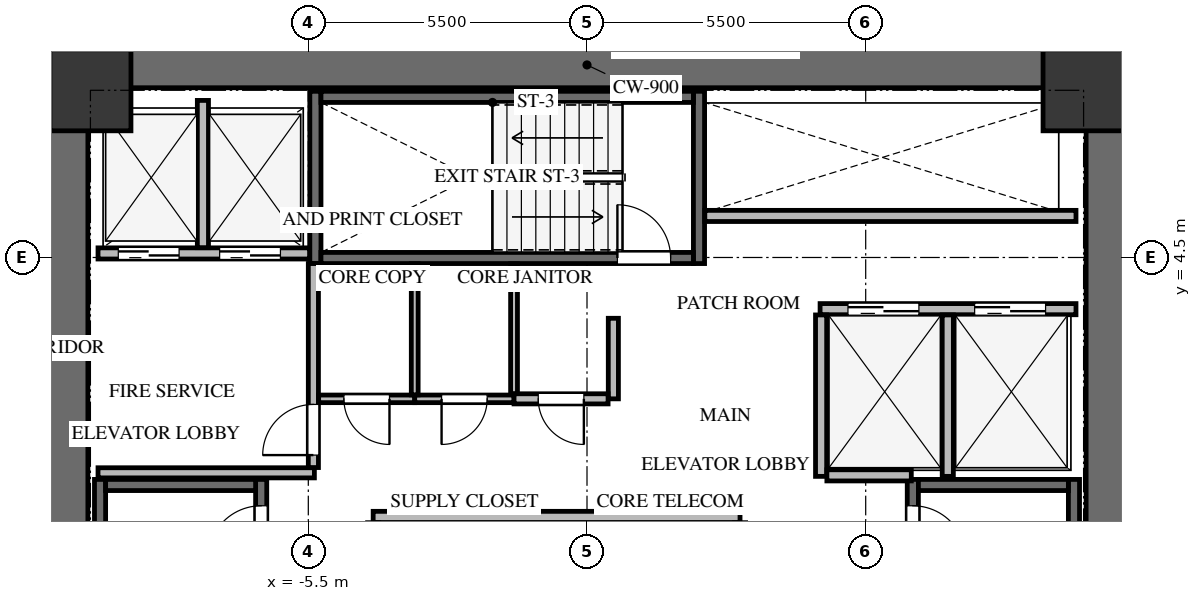
"""IFC4 building model, lengths in metres.
Left out: names, types, materials, properties, quantities, classifications, styles, units other than length and angle.
Written with IfcOpenShell. Run it as: python <this file> out.ifc"""

import sys

from ifc_helpers import new_model, si_unit, direction, frame, frame_2d, origin, origin_2d, place, context, subcontext, project, spatial, rectangle, extrude, source, transform, mapped, element, fill, save


model = new_model("IFC4")
c1 = context("Model", 3, precision=1e-05, world=origin(), true_north=direction((0.0, 1.0)))
c2 = subcontext(c1, "Body", "Model", "MODEL_VIEW")
j1 = project(units=[si_unit("LENGTHUNIT", "METRE"), si_unit("PLANEANGLEUNIT", "RADIAN")], contexts=[c1])
p1 = place(None, origin())
s1 = spatial("IfcSite", under=j1, at=p1, CompositionType="ELEMENT")
p2 = place(p1, origin())
s2 = spatial("IfcBuilding", under=s1, at=p2, CompositionType="ELEMENT")
p3 = place(p2, frame((0.0, 0.0, 52.2)))
s3 = spatial("IfcBuildingStorey", under=s2, at=p3, CompositionType="ELEMENT", Elevation=52.2)
for number, where, z_axis, x_axis in (
    (1, (-10.3, -8.75, 0.0), (0.0, 0.0, 1.0), (0.0, 1.0, 0.0)),
    (2, (10.3, -8.75, 0.0), (0.0, 0.0, 1.0), (0.0, 1.0, 0.0)),
):
    element("IfcWall", number, at=place(p3, frame(where, z_axis=z_axis, x_axis=x_axis)), inside=s3, PredefinedType="SHEAR", context=c2, shape_type="SweptSolid", body=[
        extrude(rectangle(XDim=17.5, YDim=0.9, at=frame_2d((8.75, 0.0))), origin(), (0.0, 0.0, 1.0), 3.3),
    ])
p4 = place(p3, frame((-9.85, 8.3, 0.0), z_axis=(0.0, 0.0, 1.0), x_axis=(1.0, 0.0, 0.0)))
e3 = element("IfcWall", 3, at=p4, inside=s3, PredefinedType="SHEAR", context=c2, shape_type="SweptSolid", body=[
    extrude(rectangle(XDim=19.7, YDim=0.9, at=frame_2d((9.85, 0.0))), origin(), (0.0, 0.0, 1.0), 3.3),
])
p5 = place(p3, frame((-6.43, -7.77, -0.24), z_axis=(0.0, 0.0, 1.0), x_axis=(0.0, 1.0, 0.0)))
e4 = element("IfcWall", 4, at=p5, inside=s3, PredefinedType="SHEAR", context=c2, shape_type="SweptSolid", body=[
    extrude(rectangle(XDim=7.89, YDim=0.22, at=frame_2d((3.945, 0.0))), origin(), (0.0, 0.0, 1.0), 3.3),
])
p6 = place(p5, frame((6.32, 0.0, 0.0)))
e5 = element("IfcOpeningElement", 5, at=p6, cuts=e4, PredefinedType="OPENING", context=c2, shape_type="SweptSolid", body=[
    extrude(rectangle(XDim=1.05, YDim=2.15, at=frame_2d((0.525, 1.075))), frame((0.0, 0.12, 0.0), z_axis=(0.0, -1.0, 0.0), x_axis=(1.0, 0.0, 0.0)), (0.0, 0.0, 1.0), 0.24),
])
p7 = place(p3, frame((-9.61, 0.12, -0.24), z_axis=(0.0, 0.0, 1.0), x_axis=(0.0, -1.0, 0.0)))
e6 = element("IfcWall", 6, at=p7, inside=s3, PredefinedType="SHEAR", context=c2, shape_type="SweptSolid", body=[
    extrude(rectangle(XDim=7.89, YDim=0.22, at=frame_2d((3.945, 0.0))), origin(), (0.0, 0.0, 1.0), 3.3),
])
p8 = place(p3, frame((-6.54, 0.01, -0.24), z_axis=(0.0, 0.0, 1.0), x_axis=(-1.0, 0.0, 0.0)))
e7 = element("IfcWall", 7, at=p8, inside=s3, PredefinedType="SHEAR", context=c2, shape_type="SweptSolid", body=[
    extrude(rectangle(XDim=2.96, YDim=0.22, at=frame_2d((1.48, 0.0))), origin(), (0.0, 0.0, 1.0), 3.3),
])
p9 = place(p3, frame((9.61, -7.77, -0.24), z_axis=(0.0, 0.0, 1.0), x_axis=(0.0, 1.0, 0.0)))
e8 = element("IfcWall", 8, at=p9, inside=s3, PredefinedType="SHEAR", context=c2, shape_type="SweptSolid", body=[
    extrude(rectangle(XDim=7.89, YDim=0.22, at=frame_2d((3.945, 0.0))), origin(), (0.0, 0.0, 1.0), 3.3),
])
p10 = place(p3, frame((6.43, 0.12, -0.24), z_axis=(0.0, 0.0, 1.0), x_axis=(0.0, -1.0, 0.0)))
e9 = element("IfcWall", 9, at=p10, inside=s3, PredefinedType="SHEAR", context=c2, shape_type="SweptSolid", body=[
    extrude(rectangle(XDim=7.89, YDim=0.22, at=frame_2d((3.945, 0.0))), origin(), (0.0, 0.0, 1.0), 3.3),
])
p11 = place(p10, frame((0.52, 0.0, 0.0)))
e10 = element("IfcOpeningElement", 10, at=p11, cuts=e9, PredefinedType="OPENING", context=c2, shape_type="SweptSolid", body=[
    extrude(rectangle(XDim=1.05, YDim=2.15, at=frame_2d((0.525, 1.075))), frame((0.0, 0.12, 0.0), z_axis=(0.0, -1.0, 0.0), x_axis=(1.0, 0.0, 0.0)), (0.0, 0.0, 1.0), 0.24),
])
p12 = place(p3, frame((9.5, 0.01, -0.24), z_axis=(0.0, 0.0, 1.0), x_axis=(-1.0, 0.0, 0.0)))
e11 = element("IfcWall", 11, at=p12, inside=s3, PredefinedType="SHEAR", context=c2, shape_type="SweptSolid", body=[
    extrude(rectangle(XDim=2.96, YDim=0.22, at=frame_2d((1.48, 0.0))), origin(), (0.0, 0.0, 1.0), 3.3),
])
for number, where, z_axis, x_axis in (
    (12, (2.21, 4.38, -0.24), (0.0, 0.0, 1.0), (0.0, 1.0, 0.0)),
    (13, (-5.36, 7.78, -0.24), (0.0, 0.0, 1.0), (0.0, -1.0, 0.0)),
):
    element("IfcWall", number, at=place(p3, frame(where, z_axis=z_axis, x_axis=x_axis)), inside=s3, PredefinedType="SHEAR", context=c2, shape_type="SweptSolid", body=[
        extrude(rectangle(XDim=3.4, YDim=0.22, at=frame_2d((1.7, 0.0))), origin(), (0.0, 0.0, 1.0), 3.3),
    ])
p13 = place(p3, frame((-5.25, 4.49, -0.24), z_axis=(0.0, 0.0, 1.0), x_axis=(1.0, 0.0, 0.0)))
e14 = element("IfcWall", 14, at=p13, inside=s3, PredefinedType="SHEAR", context=c2, shape_type="SweptSolid", body=[
    extrude(rectangle(XDim=7.35, YDim=0.22, at=frame_2d((3.675, 0.0))), origin(), (0.0, 0.0, 1.0), 3.3),
])
p14 = place(p13, frame((5.85, 0.0, 0.0)))
e15 = element("IfcOpeningElement", 15, at=p14, cuts=e14, PredefinedType="OPENING", context=c2, shape_type="SweptSolid", body=[
    extrude(rectangle(XDim=1.05, YDim=2.15, at=frame_2d((0.525, 1.075))), frame((0.0, 0.12, 0.0), z_axis=(0.0, -1.0, 0.0), x_axis=(1.0, 0.0, 0.0)), (0.0, 0.0, 1.0), 0.24),
])
p15 = place(p3, frame((2.1, 7.67, -0.24), z_axis=(0.0, 0.0, 1.0), x_axis=(-1.0, 0.0, 0.0)))
e16 = element("IfcWall", 16, at=p15, inside=s3, PredefinedType="SHEAR", context=c2, shape_type="SweptSolid", body=[
    extrude(rectangle(XDim=7.35, YDim=0.22, at=frame_2d((3.675, 0.0))), origin(), (0.0, 0.0, 1.0), 3.3),
])
m1 = source(origin(), c2, "Body", "SweptSolid", [
    extrude(rectangle(XDim=1.6, YDim=1.6, at=origin_2d()), origin(), (0.0, 0.0, 1.0), 3.3),
])
for number, where, z_axis, x_axis in (
    (17, (9.8, 7.8, -0.24), (0.0, 0.0, 1.0), (1.0, 0.0, 0.0)),
    (18, (-9.8, 7.8, -0.24), (0.0, 0.0, 1.0), (1.0, 0.0, 0.0)),
):
    element("IfcColumn", number, at=place(p3, frame(where, z_axis=z_axis, x_axis=x_axis)), inside=s3, PredefinedType="COLUMN", context=c2, shape_type="MappedRepresentation", body=[
        mapped(m1, transform((0.0, 0.0, 0.0), x_axis=(1.0, 0.0, 0.0), y_axis=(0.0, 1.0, 0.0), z_axis=(0.0, 0.0, 1.0), scale=1.0)),
    ])
p16 = place(p3, frame((-9.65, 4.58, 0.0), z_axis=(0.0, 0.0, 1.0), x_axis=(1.0, 0.0, 0.0)))
e19 = element("IfcWall", 19, at=p16, inside=s3, PredefinedType="SOLIDWALL", context=c2, shape_type="SweptSolid", body=[
    extrude(rectangle(XDim=4.175, YDim=0.22, at=frame_2d((2.087, 0.0))), origin(), (0.0, 0.0, 1.0), 3.045),
])
p17 = place(p16, frame((0.4, 0.0, 0.0)))
e20 = element("IfcOpeningElement", 20, at=p17, cuts=e19, PredefinedType="OPENING", context=c2, shape_type="SweptSolid", body=[
    extrude(rectangle(XDim=1.2, YDim=2.15, at=frame_2d((0.6, 1.075))), frame((0.0, 0.12, 0.0), z_axis=(0.0, -1.0, 0.0), x_axis=(1.0, 0.0, 0.0)), (0.0, 0.0, 1.0), 0.24),
])
p18 = place(p16, frame((2.4, 0.0, 0.0)))
e21 = element("IfcOpeningElement", 21, at=p18, cuts=e19, PredefinedType="OPENING", context=c2, shape_type="SweptSolid", body=[
    extrude(rectangle(XDim=1.2, YDim=2.15, at=frame_2d((0.6, 1.075))), frame((0.0, 0.12, 0.0), z_axis=(0.0, -1.0, 0.0), x_axis=(1.0, 0.0, 0.0)), (0.0, 0.0, 1.0), 0.24),
])
p19 = place(p3, frame((-7.58, 4.694, 0.0), z_axis=(0.0, 0.0, 1.0), x_axis=(0.0, 1.0, 0.0)))
e22 = element("IfcWall", 22, at=p19, inside=s3, PredefinedType="SOLIDWALL", context=c2, shape_type="SweptSolid", body=[
    extrude(rectangle(XDim=2.906, YDim=0.22, at=frame_2d((1.453, 0.0))), origin(), (0.0, 0.0, 1.0), 3.045),
])
p20 = place(p3, frame((-9.65, 0.25, 0.0), z_axis=(0.0, 0.0, 1.0), x_axis=(1.0, 0.0, 0.0)))
e23 = element("IfcWall", 23, at=p20, inside=s3, PredefinedType="SOLIDWALL", context=c2, shape_type="SweptSolid", body=[
    extrude(rectangle(XDim=4.27, YDim=0.2, at=frame_2d((2.135, 0.0))), origin(), (0.0, 0.0, 1.0), 3.045),
])
p21 = place(p3, frame((-5.4, 0.354, 0.0), z_axis=(0.0, 0.0, 1.0), x_axis=(0.0, 1.0, 0.0)))
e24 = element("IfcWall", 24, at=p21, inside=s3, PredefinedType="SOLIDWALL", context=c2, shape_type="SweptSolid", body=[
    extrude(rectangle(XDim=4.026, YDim=0.2, at=frame_2d((2.013, 0.0))), origin(), (0.0, 0.0, 1.0), 3.045),
])
p22 = place(p21, frame((0.246, 0.0, 0.0)))
e25 = element("IfcOpeningElement", 25, at=p22, cuts=e24, PredefinedType="OPENING", context=c2, shape_type="SweptSolid", body=[
    extrude(rectangle(XDim=1.0, YDim=2.15, at=frame_2d((0.5, 1.075))), frame((0.0, 0.11, 0.0), z_axis=(0.0, -1.0, 0.0), x_axis=(1.0, 0.0, 0.0)), (0.0, 0.0, 1.0), 0.22),
])
p23 = place(p3, frame((4.6, 3.48, 0.0), z_axis=(0.0, 0.0, 1.0), x_axis=(1.0, 0.0, 0.0)))
e26 = element("IfcWall", 26, at=p23, inside=s3, PredefinedType="SOLIDWALL", context=c2, shape_type="SweptSolid", body=[
    extrude(rectangle(XDim=5.05, YDim=0.22, at=frame_2d((2.525, 0.0))), origin(), (0.0, 0.0, 1.0), 3.045),
])
p24 = place(p23, frame((0.55, 0.0, 0.0)))
e27 = element("IfcOpeningElement", 27, at=p24, cuts=e26, PredefinedType="OPENING", context=c2, shape_type="SweptSolid", body=[
    extrude(rectangle(XDim=1.4, YDim=2.15, at=frame_2d((0.7, 1.075))), frame((0.0, 0.12, 0.0), z_axis=(0.0, -1.0, 0.0), x_axis=(1.0, 0.0, 0.0)), (0.0, 0.0, 1.0), 0.24),
])
p25 = place(p23, frame((3.05, 0.0, 0.0)))
e28 = element("IfcOpeningElement", 28, at=p25, cuts=e26, PredefinedType="OPENING", context=c2, shape_type="SweptSolid", body=[
    extrude(rectangle(XDim=1.4, YDim=2.15, at=frame_2d((0.7, 1.075))), frame((0.0, 0.12, 0.0), z_axis=(0.0, -1.0, 0.0), x_axis=(1.0, 0.0, 0.0)), (0.0, 0.0, 1.0), 0.24),
])
for number, where, z_axis, x_axis in (
    (29, (4.62, 0.18, 0.0), (0.0, 0.0, 1.0), (0.0, 1.0, 0.0)),
    (30, (7.12, 0.18, 0.0), (0.0, 0.0, 1.0), (0.0, 1.0, 0.0)),
):
    element("IfcWall", number, at=place(p3, frame(where, z_axis=z_axis, x_axis=x_axis)), inside=s3, PredefinedType="SOLIDWALL", context=c2, shape_type="SweptSolid", body=[
        extrude(rectangle(XDim=3.186, YDim=0.22, at=frame_2d((1.593, 0.0))), origin(), (0.0, 0.0, 1.0), 3.045),
    ])
p26 = place(p3, frame((4.734, 0.2, 0.0), z_axis=(0.0, 0.0, 1.0), x_axis=(1.0, 0.0, 0.0)))
e31 = element("IfcWall", 31, at=p26, inside=s3, PredefinedType="SOLIDWALL", context=c2, shape_type="SweptSolid", body=[
    extrude(rectangle(XDim=1.666, YDim=0.22, at=frame_2d((0.833, 0.0))), origin(), (0.0, 0.0, 1.0), 3.045),
])
p27 = place(p3, frame((-4.22, -0.62, 0.0), z_axis=(0.0, 0.0, 1.0), x_axis=(1.0, 0.0, 0.0)))
e32 = element("IfcWall", 32, at=p27, inside=s3, PredefinedType="SOLIDWALL", context=c2, shape_type="SweptSolid", body=[
    extrude(rectangle(XDim=7.24, YDim=0.22, at=frame_2d((3.62, 0.0))), origin(), (0.0, 0.0, 1.0), 3.045),
])
p28 = place(p3, frame((2.325, 5.32, 0.0), z_axis=(0.0, 0.0, 1.0), x_axis=(1.0, 0.0, 0.0)))
e33 = element("IfcWall", 33, at=p28, inside=s3, PredefinedType="SOLIDWALL", context=c2, shape_type="SweptSolid", body=[
    extrude(rectangle(XDim=7.325, YDim=0.22, at=frame_2d((3.663, 0.0))), origin(), (0.0, 0.0, 1.0), 3.045),
])
p29 = place(p3, frame((-3.4, 1.71, 0.0), z_axis=(0.0, 0.0, 1.0), x_axis=(-1.0, 0.0, 0.0)))
e34 = element("IfcWall", 34, at=p29, inside=s3, PredefinedType="PARTITIONING", context=c2, shape_type="SweptSolid", body=[
    extrude(rectangle(XDim=1.896, YDim=0.15, at=frame_2d((0.948, 0.0))), origin(), (0.0, 0.0, 1.0), 3.045),
])
p30 = place(p29, frame((0.498, 0.0, 0.0)))
e35 = element("IfcOpeningElement", 35, at=p30, cuts=e34, PredefinedType="OPENING", context=c2, shape_type="SweptSolid", body=[
    extrude(rectangle(XDim=0.9, YDim=2.05, at=frame_2d((0.45, 1.025))), frame((0.0, 0.085, 0.0), z_axis=(0.0, -1.0, 0.0), x_axis=(1.0, 0.0, 0.0)), (0.0, 0.0, 1.0), 0.17),
])
p31 = place(p3, frame((-1.44, 1.71, 0.0), z_axis=(0.0, 0.0, 1.0), x_axis=(-1.0, 0.0, 0.0)))
e36 = element("IfcWall", 36, at=p31, inside=s3, PredefinedType="PARTITIONING", context=c2, shape_type="SweptSolid", body=[
    extrude(rectangle(XDim=1.96, YDim=0.15, at=frame_2d((0.98, 0.0))), origin(), (0.0, 0.0, 1.0), 3.045),
])
p32 = place(p31, frame((0.53, 0.0, 0.0)))
e37 = element("IfcOpeningElement", 37, at=p32, cuts=e36, PredefinedType="OPENING", context=c2, shape_type="SweptSolid", body=[
    extrude(rectangle(XDim=0.9, YDim=2.05, at=frame_2d((0.45, 1.025))), frame((0.0, 0.085, 0.0), z_axis=(0.0, -1.0, 0.0), x_axis=(1.0, 0.0, 0.0)), (0.0, 0.0, 1.0), 0.17),
])
p33 = place(p3, frame((0.52, 3.3, 0.0), z_axis=(0.0, 0.0, 1.0), x_axis=(0.0, -1.0, 0.0)))
e38 = element("IfcWall", 38, at=p33, inside=s3, PredefinedType="SOLIDWALL", context=c2, shape_type="SweptSolid", body=[
    extrude(rectangle(XDim=1.59, YDim=0.2, at=frame_2d((0.795, 0.0))), origin(), (0.0, 0.0, 1.0), 3.045),
])
p34 = place(p3, frame((0.416, 1.71, 0.0), z_axis=(0.0, 0.0, 1.0), x_axis=(-1.0, 0.0, 0.0)))
e39 = element("IfcWall", 39, at=p34, inside=s3, PredefinedType="SOLIDWALL", context=c2, shape_type="SweptSolid", body=[
    extrude(rectangle(XDim=1.856, YDim=0.2, at=frame_2d((0.928, 0.0))), origin(), (0.0, 0.0, 1.0), 3.045),
])
p35 = place(p34, frame((0.478, 0.0, 0.0)))
e40 = element("IfcOpeningElement", 40, at=p35, cuts=e39, PredefinedType="OPENING", context=c2, shape_type="SweptSolid", body=[
    extrude(rectangle(XDim=0.9, YDim=2.05, at=frame_2d((0.45, 1.025))), frame((0.0, 0.11, 0.0), z_axis=(0.0, -1.0, 0.0), x_axis=(1.0, 0.0, 0.0)), (0.0, 0.0, 1.0), 0.22),
])
p36 = place(p3, frame((-3.4, 4.375, 0.0), z_axis=(0.0, 0.0, 1.0), x_axis=(0.0, -1.0, 0.0)))
e41 = element("IfcWall", 41, at=p36, inside=s3, PredefinedType="PARTITIONING", context=c2, shape_type="SweptSolid", body=[
    extrude(rectangle(XDim=2.586, YDim=0.135, at=frame_2d((1.293, 0.0))), origin(), (0.0, 0.0, 1.0), 3.045),
])
p37 = place(p3, frame((-1.44, 4.375, 0.0), z_axis=(0.0, 0.0, 1.0), x_axis=(0.0, -1.0, 0.0)))
e42 = element("IfcWall", 42, at=p37, inside=s3, PredefinedType="PARTITIONING", context=c2, shape_type="SweptSolid", body=[
    extrude(rectangle(XDim=2.561, YDim=0.135, at=frame_2d((1.281, 0.0))), origin(), (0.0, 0.0, 1.0), 3.045),
])
m2 = source(origin(), c2, "Body", "SweptSolid", [
    extrude(rectangle(XDim=1.05, YDim=2.15, at=frame_2d((0.525, 1.075))), frame((0.0, 0.025, 0.0), z_axis=(0.0, -1.0, 0.0), x_axis=(1.0, 0.0, 0.0)), (0.0, 0.0, 1.0), 0.05),
])
p38 = place(p6, origin())
e43 = element("IfcDoor", 43, at=p38, inside=s3, OperationType="SINGLE_SWING_LEFT", PredefinedType="DOOR", context=c2, shape_type="MappedRepresentation", body=[
    mapped(m2, transform((0.0, 0.0, 0.0), x_axis=(1.0, 0.0, 0.0), y_axis=(0.0, 1.0, 0.0), z_axis=(0.0, 0.0, 1.0), scale=1.0)),
])
fill(e5, e43)
m3 = source(origin(), c2, "Body", "SweptSolid", [
    extrude(rectangle(XDim=1.05, YDim=2.15, at=frame_2d((0.525, 1.075))), frame((0.0, 0.025, 0.0), z_axis=(0.0, -1.0, 0.0), x_axis=(1.0, 0.0, 0.0)), (0.0, 0.0, 1.0), 0.05),
])
p39 = place(p11, origin())
e44 = element("IfcDoor", 44, at=p39, inside=s3, OperationType="SINGLE_SWING_RIGHT", PredefinedType="DOOR", context=c2, shape_type="MappedRepresentation", body=[
    mapped(m3, transform((0.0, 0.0, 0.0), x_axis=(1.0, 0.0, 0.0), y_axis=(0.0, 1.0, 0.0), z_axis=(0.0, 0.0, 1.0), scale=1.0)),
])
fill(e10, e44)
p40 = place(p14, origin())
e45 = element("IfcDoor", 45, at=p40, inside=s3, OperationType="SINGLE_SWING_LEFT", PredefinedType="DOOR", context=c2, shape_type="MappedRepresentation", body=[
    mapped(m2, transform((0.0, 0.0, 0.0), x_axis=(1.0, 0.0, 0.0), y_axis=(0.0, 1.0, 0.0), z_axis=(0.0, 0.0, 1.0), scale=1.0)),
])
fill(e15, e45)
m4 = source(origin(), c2, "Body", "SweptSolid", [
    extrude(rectangle(XDim=1.2, YDim=2.15, at=frame_2d((0.6, 1.075))), frame((0.0, 0.025, 0.0), z_axis=(0.0, -1.0, 0.0), x_axis=(1.0, 0.0, 0.0)), (0.0, 0.0, 1.0), 0.05),
])
p41 = place(p17, origin())
e46 = element("IfcDoor", 46, at=p41, inside=s3, OperationType="DOUBLE_DOOR_SLIDING", PredefinedType="DOOR", context=c2, shape_type="MappedRepresentation", body=[
    mapped(m4, transform((0.0, 0.0, 0.0), x_axis=(1.0, 0.0, 0.0), y_axis=(0.0, 1.0, 0.0), z_axis=(0.0, 0.0, 1.0), scale=1.0)),
])
fill(e20, e46)
p42 = place(p18, origin())
e47 = element("IfcDoor", 47, at=p42, inside=s3, OperationType="DOUBLE_DOOR_SLIDING", PredefinedType="DOOR", context=c2, shape_type="MappedRepresentation", body=[
    mapped(m4, transform((0.0, 0.0, 0.0), x_axis=(1.0, 0.0, 0.0), y_axis=(0.0, 1.0, 0.0), z_axis=(0.0, 0.0, 1.0), scale=1.0)),
])
fill(e21, e47)
m5 = source(origin(), c2, "Body", "SweptSolid", [
    extrude(rectangle(XDim=1.0, YDim=2.15, at=frame_2d((0.5, 1.075))), frame((0.0, 0.025, 0.0), z_axis=(0.0, -1.0, 0.0), x_axis=(1.0, 0.0, 0.0)), (0.0, 0.0, 1.0), 0.05),
])
p43 = place(p22, origin())
e48 = element("IfcDoor", 48, at=p43, inside=s3, OperationType="SINGLE_SWING_LEFT", PredefinedType="DOOR", context=c2, shape_type="MappedRepresentation", body=[
    mapped(m5, transform((0.0, 0.0, 0.0), x_axis=(1.0, 0.0, 0.0), y_axis=(0.0, 1.0, 0.0), z_axis=(0.0, 0.0, 1.0), scale=1.0)),
])
fill(e25, e48)
m6 = source(origin(), c2, "Body", "SweptSolid", [
    extrude(rectangle(XDim=1.4, YDim=2.15, at=frame_2d((0.7, 1.075))), frame((0.0, 0.025, 0.0), z_axis=(0.0, -1.0, 0.0), x_axis=(1.0, 0.0, 0.0)), (0.0, 0.0, 1.0), 0.05),
])
p44 = place(p24, origin())
e49 = element("IfcDoor", 49, at=p44, inside=s3, OperationType="DOUBLE_DOOR_SLIDING", PredefinedType="DOOR", context=c2, shape_type="MappedRepresentation", body=[
    mapped(m6, transform((0.0, 0.0, 0.0), x_axis=(1.0, 0.0, 0.0), y_axis=(0.0, 1.0, 0.0), z_axis=(0.0, 0.0, 1.0), scale=1.0)),
])
fill(e27, e49)
p45 = place(p25, origin())
e50 = element("IfcDoor", 50, at=p45, inside=s3, OperationType="DOUBLE_DOOR_SLIDING", PredefinedType="DOOR", context=c2, shape_type="MappedRepresentation", body=[
    mapped(m6, transform((0.0, 0.0, 0.0), x_axis=(1.0, 0.0, 0.0), y_axis=(0.0, 1.0, 0.0), z_axis=(0.0, 0.0, 1.0), scale=1.0)),
])
fill(e28, e50)
m7 = source(origin(), c2, "Body", "SweptSolid", [
    extrude(rectangle(XDim=0.9, YDim=2.05, at=frame_2d((0.45, 1.025))), frame((0.0, 0.025, 0.0), z_axis=(0.0, -1.0, 0.0), x_axis=(1.0, 0.0, 0.0)), (0.0, 0.0, 1.0), 0.05),
])
p46 = place(p30, origin())
e51 = element("IfcDoor", 51, at=p46, inside=s3, OperationType="SINGLE_SWING_LEFT", PredefinedType="DOOR", context=c2, shape_type="MappedRepresentation", body=[
    mapped(m7, transform((0.0, 0.0, 0.0), x_axis=(1.0, 0.0, 0.0), y_axis=(0.0, 1.0, 0.0), z_axis=(0.0, 0.0, 1.0), scale=1.0)),
])
fill(e35, e51)
m8 = source(origin(), c2, "Body", "SweptSolid", [
    extrude(rectangle(XDim=0.9, YDim=2.05, at=frame_2d((0.45, 1.025))), frame((0.0, 0.025, 0.0), z_axis=(0.0, -1.0, 0.0), x_axis=(1.0, 0.0, 0.0)), (0.0, 0.0, 1.0), 0.05),
])
p47 = place(p32, origin())
e52 = element("IfcDoor", 52, at=p47, inside=s3, OperationType="SINGLE_SWING_RIGHT", PredefinedType="DOOR", context=c2, shape_type="MappedRepresentation", body=[
    mapped(m8, transform((0.0, 0.0, 0.0), x_axis=(1.0, 0.0, 0.0), y_axis=(0.0, 1.0, 0.0), z_axis=(0.0, 0.0, 1.0), scale=1.0)),
])
fill(e37, e52)
p48 = place(p35, origin())
e53 = element("IfcDoor", 53, at=p48, inside=s3, OperationType="SINGLE_SWING_LEFT", PredefinedType="DOOR", context=c2, shape_type="MappedRepresentation", body=[
    mapped(m7, transform((0.0, 0.0, 0.0), x_axis=(1.0, 0.0, 0.0), y_axis=(0.0, 1.0, 0.0), z_axis=(0.0, 0.0, 1.0), scale=1.0)),
])
fill(e40, e53)
save(model, sys.argv[1])
